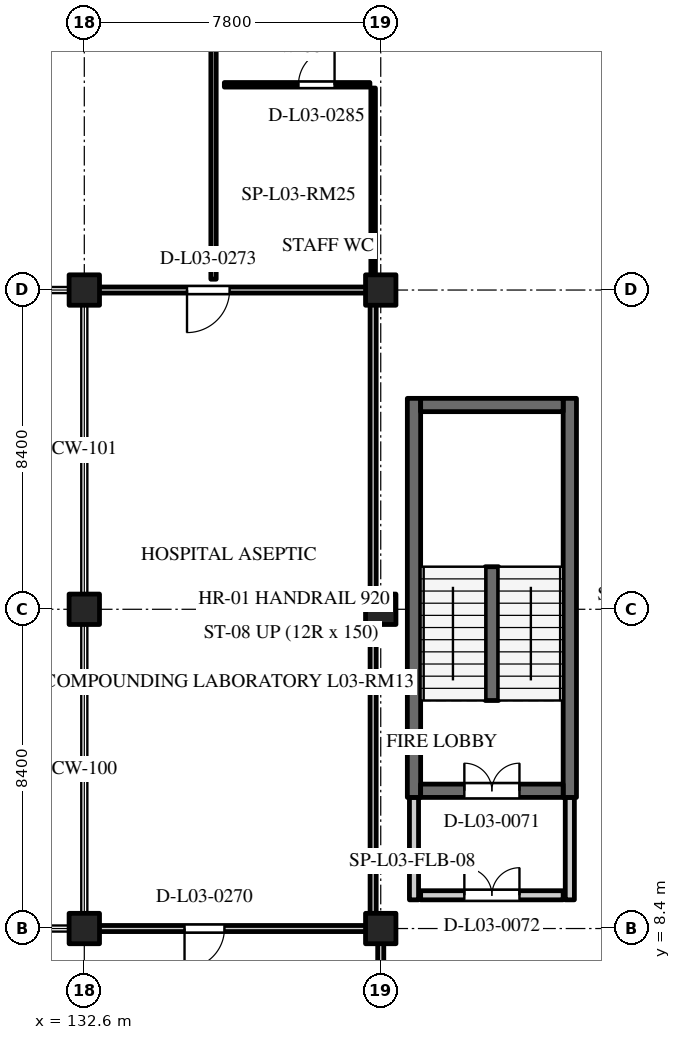
"""IFC4 building model, lengths in metres.
Left out: names, types, materials, properties, quantities, classifications, styles, units other than length and angle.
Written with IfcOpenShell. Run it as: python <this file> out.ifc"""

import sys

from ifc_helpers import new_model, si_unit, direction, frame, frame_2d, origin, origin_2d, place, context, subcontext, project, spatial, rectangle, extrude, element, fill, save


model = new_model("IFC4")
c1 = context("Model", 3, precision=1e-05, world=origin(), true_north=direction((0.0, 1.0)))
c2 = subcontext(c1, "Body", "Model", "MODEL_VIEW")
j1 = project(units=[si_unit("LENGTHUNIT", "METRE"), si_unit("PLANEANGLEUNIT", "RADIAN")], contexts=[c1])
p1 = place(None, origin())
s1 = spatial("IfcSite", under=j1, at=p1, CompositionType="ELEMENT")
p2 = place(p1, origin())
s2 = spatial("IfcBuilding", under=s1, at=p2, CompositionType="ELEMENT")
p3 = place(p2, frame((0.0, 0.0, 14.4)))
s3 = spatial("IfcBuildingStorey", under=s2, at=p3, CompositionType="ELEMENT", Elevation=14.4)
for number, where, z_axis, x_axis in (
    (1, (132.6, 8.4, 0.0), (0.0, 0.0, 1.0), (1.0, 0.0, 0.0)),
    (2, (132.6, 16.8, 0.0), (0.0, 0.0, 1.0), (1.0, 0.0, 0.0)),
    (3, (132.6, 25.2, 0.0), (0.0, 0.0, 1.0), (1.0, 0.0, 0.0)),
    (4, (140.4, 8.4, 0.0), (0.0, 0.0, 1.0), (1.0, 0.0, 0.0)),
    (5, (140.4, 16.8, 0.0), (0.0, 0.0, 1.0), (1.0, 0.0, 0.0)),
    (6, (140.4, 25.2, 0.0), (0.0, 0.0, 1.0), (1.0, 0.0, 0.0)),
):
    element("IfcColumn", number, at=place(p3, frame(where, z_axis=z_axis, x_axis=x_axis)), inside=s3, PredefinedType="COLUMN", context=c2, shape_type="SweptSolid", body=[
        extrude(rectangle(XDim=0.8, YDim=0.8, at=origin_2d()), origin(), (0.0, 0.0, 1.0), 3.6),
    ])
for number, where, z_axis, x_axis in (
    (7, (141.275, 11.85, 0.0), (0.0, 0.0, 1.0), (0.0, 1.0, 0.0)),
    (8, (145.375, 11.85, 0.0), (0.0, 0.0, 1.0), (0.0, 1.0, 0.0)),
):
    element("IfcWall", number, at=place(p3, frame(where, z_axis=z_axis, x_axis=x_axis)), inside=s3, PredefinedType="SHEAR", context=c2, shape_type="SweptSolid", body=[
        extrude(rectangle(XDim=10.5, YDim=0.35, at=frame_2d((5.25, 0.0))), origin(), (0.0, 0.0, 1.0), 3.6),
    ])
p4 = place(p3, frame((141.45, 22.175, 0.0), z_axis=(0.0, 0.0, 1.0), x_axis=(1.0, 0.0, 0.0)))
e9 = element("IfcWall", 9, at=p4, inside=s3, PredefinedType="SHEAR", context=c2, shape_type="SweptSolid", body=[
    extrude(rectangle(XDim=3.75, YDim=0.35, at=frame_2d((1.875, 0.0))), origin(), (0.0, 0.0, 1.0), 3.6),
])
p5 = place(p3, frame((141.45, 12.025, 0.0), z_axis=(0.0, 0.0, 1.0), x_axis=(1.0, 0.0, 0.0)))
e10 = element("IfcWall", 10, at=p5, inside=s3, PredefinedType="SHEAR", context=c2, shape_type="SweptSolid", body=[
    extrude(rectangle(XDim=3.75, YDim=0.35, at=frame_2d((1.875, 0.0))), origin(), (0.0, 0.0, 1.0), 3.27),
])
p6 = place(p5, frame((1.15, 0.0, 0.0)))
e11 = element("IfcOpeningElement", 11, at=p6, cuts=e10, PredefinedType="OPENING", context=c2, shape_type="SweptSolid", body=[
    extrude(rectangle(XDim=1.45, YDim=2.2, at=frame_2d((0.725, 1.1))), frame((0.0, 0.187, 0.0), z_axis=(0.0, -1.0, 0.0), x_axis=(1.0, 0.0, 0.0)), (0.0, 0.0, 1.0), 0.374),
])
for number, where, z_axis, x_axis in (
    (12, (141.275, 9.155, 0.0), (0.0, 0.0, 1.0), (0.0, 1.0, 0.0)),
    (13, (145.375, 9.155, 0.0), (0.0, 0.0, 1.0), (0.0, 1.0, 0.0)),
):
    element("IfcWall", number, at=place(p3, frame(where, z_axis=z_axis, x_axis=x_axis)), inside=s3, PredefinedType="STANDARD", context=c2, shape_type="SweptSolid", body=[
        extrude(rectangle(XDim=2.695, YDim=0.24, at=frame_2d((1.348, 0.0))), origin(), (0.0, 0.0, 1.0), 3.27),
    ])
p7 = place(p3, frame((141.45, 9.275, 0.0), z_axis=(0.0, 0.0, 1.0), x_axis=(1.0, 0.0, 0.0)))
e14 = element("IfcWall", 14, at=p7, inside=s3, PredefinedType="STANDARD", context=c2, shape_type="SweptSolid", body=[
    extrude(rectangle(XDim=3.75, YDim=0.24, at=frame_2d((1.875, 0.0))), origin(), (0.0, 0.0, 1.0), 3.27),
])
p8 = place(p7, frame((1.15, 0.0, 0.0)))
e15 = element("IfcOpeningElement", 15, at=p8, cuts=e14, PredefinedType="OPENING", context=c2, shape_type="SweptSolid", body=[
    extrude(rectangle(XDim=1.45, YDim=2.2, at=frame_2d((0.725, 1.1))), frame((0.0, 0.132, 0.0), z_axis=(0.0, -1.0, 0.0), x_axis=(1.0, 0.0, 0.0)), (0.0, 0.0, 1.0), 0.264),
])
p9 = place(p3, frame((143.325, 14.4, 0.0), z_axis=(0.0, 0.0, 1.0), x_axis=(0.0, 1.0, 0.0)))
e16 = element("IfcWall", 16, at=p9, inside=s3, PredefinedType="SHEAR", context=c2, shape_type="SweptSolid", body=[
    extrude(rectangle(XDim=3.52, YDim=0.35, at=frame_2d((1.76, 0.0))), origin(), (0.0, 0.0, 1.0), 3.6),
])
p10 = place(p3, frame((132.24, 8.4, 0.0), z_axis=(0.0, 0.0, 1.0), x_axis=(1.0, 0.0, 0.0)))
e17 = element("IfcWall", 17, at=p10, inside=s3, PredefinedType="PARTITIONING", context=c2, shape_type="SweptSolid", body=[
    extrude(rectangle(XDim=8.075, YDim=0.16, at=frame_2d((4.038, 0.0))), origin(), (0.0, 0.0, 1.0), 3.25),
])
p11 = place(p10, frame((2.997, 0.0, 0.0)))
e18 = element("IfcOpeningElement", 18, at=p11, cuts=e17, PredefinedType="OPENING", context=c2, shape_type="SweptSolid", body=[
    extrude(rectangle(XDim=1.05, YDim=2.1, at=frame_2d((0.525, 1.05))), frame((0.0, 0.092, 0.0), z_axis=(0.0, -1.0, 0.0), x_axis=(1.0, 0.0, 0.0)), (0.0, 0.0, 1.0), 0.184),
])
p12 = place(p3, frame((140.4, 0.085, 0.0), z_axis=(0.0, 0.0, 1.0), x_axis=(0.0, 1.0, 0.0)))
e19 = element("IfcWall", 19, at=p12, inside=s3, PredefinedType="PARTITIONING", context=c2, shape_type="SweptSolid", body=[
    extrude(rectangle(XDim=8.23, YDim=0.16, at=frame_2d((4.115, 0.0))), origin(), (0.0, 0.0, 1.0), 3.25),
])
p13 = place(p3, frame((132.685, 25.2, 0.0), z_axis=(0.0, 0.0, 1.0), x_axis=(1.0, 0.0, 0.0)))
e20 = element("IfcWall", 20, at=p13, inside=s3, PredefinedType="PARTITIONING", context=c2, shape_type="SweptSolid", body=[
    extrude(rectangle(XDim=7.43, YDim=0.16, at=frame_2d((3.715, 0.0))), origin(), (0.0, 0.0, 1.0), 2.62),
])
p14 = place(p13, frame((2.618, 0.0, 0.0)))
e21 = element("IfcOpeningElement", 21, at=p14, cuts=e20, PredefinedType="OPENING", context=c2, shape_type="SweptSolid", body=[
    extrude(rectangle(XDim=1.12, YDim=2.2, at=frame_2d((0.56, 1.1))), frame((0.0, 0.092, 0.0), z_axis=(0.0, -1.0, 0.0), x_axis=(1.0, 0.0, 0.0)), (0.0, 0.0, 1.0), 0.184),
])
p15 = place(p3, frame((132.6, 16.44, 0.0), z_axis=(0.0, 0.0, 1.0), x_axis=(0.0, 1.0, 0.0)))
e22 = element("IfcWall", 22, at=p15, inside=s3, PredefinedType="PARTITIONING", context=c2, shape_type="SweptSolid", body=[
    extrude(rectangle(XDim=0.72, YDim=0.16, at=frame_2d((0.36, 0.0))), origin(), (0.0, 0.0, 1.0), 2.62),
])
p16 = place(p3, frame((140.2, 8.485, 0.0), z_axis=(0.0, 0.0, 1.0), x_axis=(0.0, 1.0, 0.0)))
e23 = element("IfcWall", 23, at=p16, inside=s3, PredefinedType="PARTITIONING", context=c2, shape_type="SweptSolid", body=[
    extrude(rectangle(XDim=16.63, YDim=0.16, at=frame_2d((8.315, 0.0))), origin(), (0.0, 0.0, 1.0), 3.25),
])
p17 = place(p3, frame((132.24, 25.4, 0.0), z_axis=(0.0, 0.0, 1.0), x_axis=(1.0, 0.0, 0.0)))
e24 = element("IfcWall", 24, at=p17, inside=s3, PredefinedType="PARTITIONING", context=c2, shape_type="SweptSolid", body=[
    extrude(rectangle(XDim=0.405, YDim=0.14, at=frame_2d((0.203, 0.0))), origin(), (0.0, 0.0, 1.0), 2.62),
])
p18 = place(p3, frame((136.0, 25.485, 0.0), z_axis=(0.0, 0.0, 1.0), x_axis=(0.0, 1.0, 0.0)))
e25 = element("IfcWall", 25, at=p18, inside=s3, PredefinedType="PARTITIONING", context=c2, shape_type="SweptSolid", body=[
    extrude(rectangle(XDim=8.03, YDim=0.14, at=frame_2d((4.015, 0.0))), origin(), (0.0, 0.0, 1.0), 3.25),
])
p19 = place(p3, frame((136.285, 30.6, 0.0), z_axis=(0.0, 0.0, 1.0), x_axis=(1.0, 0.0, 0.0)))
e26 = element("IfcWall", 26, at=p19, inside=s3, PredefinedType="PARTITIONING", context=c2, shape_type="SweptSolid", body=[
    extrude(rectangle(XDim=3.83, YDim=0.12, at=frame_2d((1.915, 0.0))), origin(), (0.0, 0.0, 1.0), 3.25),
])
p20 = place(p19, frame((1.95, 0.0, 0.0)))
e27 = element("IfcOpeningElement", 27, at=p20, cuts=e26, PredefinedType="OPENING", context=c2, shape_type="SweptSolid", body=[
    extrude(rectangle(XDim=0.95, YDim=2.1, at=frame_2d((0.475, 1.05))), frame((0.0, 0.072, 0.0), z_axis=(0.0, -1.0, 0.0), x_axis=(1.0, 0.0, 0.0)), (0.0, 0.0, 1.0), 0.144),
])
p21 = place(p3, frame((140.2, 25.485, 0.0), z_axis=(0.0, 0.0, 1.0), x_axis=(0.0, 1.0, 0.0)))
e28 = element("IfcWall", 28, at=p21, inside=s3, PredefinedType="PARTITIONING", context=c2, shape_type="SweptSolid", body=[
    extrude(rectangle(XDim=5.03, YDim=0.12, at=frame_2d((2.515, 0.0))), origin(), (0.0, 0.0, 1.0), 3.25),
])
p22 = place(p6, origin())
e29 = element("IfcDoor", 29, at=p22, inside=s3, OperationType="DOUBLE_DOOR_SINGLE_SWING", PredefinedType="DOOR", context=c2, shape_type="SweptSolid", body=[
    extrude(rectangle(XDim=1.45, YDim=2.2, at=frame_2d((0.725, 1.1))), frame((0.0, 0.025, 0.0), z_axis=(0.0, -1.0, 0.0), x_axis=(1.0, 0.0, 0.0)), (0.0, 0.0, 1.0), 0.05),
])
fill(e11, e29)
p23 = place(p8, origin())
e30 = element("IfcDoor", 30, at=p23, inside=s3, OperationType="DOUBLE_DOOR_SINGLE_SWING", PredefinedType="DOOR", context=c2, shape_type="SweptSolid", body=[
    extrude(rectangle(XDim=1.45, YDim=2.2, at=frame_2d((0.725, 1.1))), frame((0.0, 0.025, 0.0), z_axis=(0.0, -1.0, 0.0), x_axis=(1.0, 0.0, 0.0)), (0.0, 0.0, 1.0), 0.05),
])
fill(e15, e30)
p24 = place(p11, frame((1.05, 0.0, 0.0), z_axis=(0.0, 0.0, 1.0), x_axis=(-1.0, 0.0, 0.0)))
e31 = element("IfcDoor", 31, at=p24, inside=s3, OperationType="SINGLE_SWING_RIGHT", PredefinedType="DOOR", context=c2, shape_type="SweptSolid", body=[
    extrude(rectangle(XDim=1.05, YDim=2.1, at=frame_2d((0.525, 1.05))), frame((0.0, 0.025, 0.0), z_axis=(0.0, -1.0, 0.0), x_axis=(1.0, 0.0, 0.0)), (0.0, 0.0, 1.0), 0.05),
])
fill(e18, e31)
p25 = place(p14, frame((1.12, 0.0, 0.0), z_axis=(0.0, 0.0, 1.0), x_axis=(-1.0, 0.0, 0.0)))
e32 = element("IfcDoor", 32, at=p25, inside=s3, OperationType="SINGLE_SWING_RIGHT", PredefinedType="DOOR", context=c2, shape_type="SweptSolid", body=[
    extrude(rectangle(XDim=1.12, YDim=2.2, at=frame_2d((0.56, 1.1))), frame((0.0, 0.025, 0.0), z_axis=(0.0, -1.0, 0.0), x_axis=(1.0, 0.0, 0.0)), (0.0, 0.0, 1.0), 0.05),
])
fill(e21, e32)
p26 = place(p20, frame((0.95, 0.0, 0.0), z_axis=(0.0, 0.0, 1.0), x_axis=(-1.0, 0.0, 0.0)))
e33 = element("IfcDoor", 33, at=p26, inside=s3, OperationType="SINGLE_SWING_LEFT", PredefinedType="DOOR", context=c2, shape_type="SweptSolid", body=[
    extrude(rectangle(XDim=0.95, YDim=2.1, at=frame_2d((0.475, 1.05))), frame((0.0, 0.025, 0.0), z_axis=(0.0, -1.0, 0.0), x_axis=(1.0, 0.0, 0.0)), (0.0, 0.0, 1.0), 0.05),
])
fill(e27, e33)
save(model, sys.argv[1])
